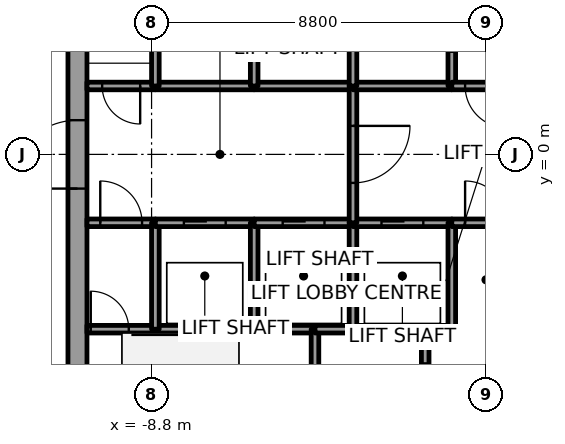
"""IFC4 building model, lengths in metres.
Left out: names, types, materials, properties, quantities, classifications, styles, units other than length and angle.
Written with IfcOpenShell. Run it as: python <this file> out.ifc"""

import sys

from ifc_helpers import new_model, si_unit, direction, frame, frame_2d, origin, place, context, subcontext, project, spatial, rectangle, extrude, element, fill, save


model = new_model("IFC4")
c1 = context("Model", 3, precision=1e-05, world=origin(), true_north=direction((0.0, 1.0)))
c2 = subcontext(c1, "Body", "Model", "MODEL_VIEW")
j1 = project(units=[si_unit("LENGTHUNIT", "METRE"), si_unit("PLANEANGLEUNIT", "RADIAN")], contexts=[c1])
p1 = place(None, origin())
s1 = spatial("IfcSite", under=j1, at=p1, CompositionType="ELEMENT")
p2 = place(p1, origin())
s2 = spatial("IfcBuilding", under=s1, at=p2, CompositionType="ELEMENT")
p3 = place(p2, frame((0.0, 0.0, 66.5)))
s3 = spatial("IfcBuildingStorey", under=s2, at=p3, CompositionType="ELEMENT", Elevation=66.5)
p4 = place(p3, frame((-10.75, -7.5, 0.0), z_axis=(0.0, 0.0, 1.0), x_axis=(0.0, 1.0, 0.0)))
e1 = element("IfcWall", 1, at=p4, inside=s3, PredefinedType="SHEAR", context=c2, shape_type="SweptSolid", body=[
    extrude(rectangle(XDim=15.0, YDim=0.5, at=frame_2d((7.5, 0.0))), origin(), (0.0, 0.0, 1.0), 3.7),
])
p5 = place(p4, frame((6.6, 0.0, 0.0)))
e2 = element("IfcOpeningElement", 2, at=p5, cuts=e1, PredefinedType="OPENING", context=c2, shape_type="SweptSolid", body=[
    extrude(rectangle(XDim=1.8, YDim=2.1, at=frame_2d((0.9, 1.05))), frame((0.0, 0.25, 0.0), z_axis=(0.0, -1.0, 0.0), x_axis=(1.0, 0.0, 0.0)), (0.0, 0.0, 1.0), 0.5),
])
p6 = place(p3, frame((-10.5, -4.6, 0.0), z_axis=(0.0, 0.0, 1.0), x_axis=(1.0, 0.0, 0.0)))
e3 = element("IfcWall", 3, at=p6, inside=s3, PredefinedType="SOLIDWALL", context=c2, shape_type="SweptSolid", body=[
    extrude(rectangle(XDim=1.8, YDim=0.2, at=frame_2d((0.9, 0.0))), origin(), (0.0, 0.0, 1.0), 3.55),
])
p7 = place(p6, frame((0.1, 0.0, 0.0)))
e4 = element("IfcOpeningElement", 4, at=p7, cuts=e3, PredefinedType="OPENING", context=c2, shape_type="SweptSolid", body=[
    extrude(rectangle(XDim=1.0, YDim=2.1, at=frame_2d((0.5, 1.05))), frame((0.0, 0.1, 0.0), z_axis=(0.0, -1.0, 0.0), x_axis=(1.0, 0.0, 0.0)), (0.0, 0.0, 1.0), 0.2),
])
p8 = place(p3, frame((-10.5, -1.8, 0.0), z_axis=(0.0, 0.0, 1.0), x_axis=(1.0, 0.0, 0.0)))
e5 = element("IfcWall", 5, at=p8, inside=s3, PredefinedType="SOLIDWALL", context=c2, shape_type="SweptSolid", body=[
    extrude(rectangle(XDim=1.8, YDim=0.2, at=frame_2d((0.9, 0.0))), origin(), (0.0, 0.0, 1.0), 3.55),
])
p9 = place(p8, frame((0.35, 0.0, 0.0)))
e6 = element("IfcOpeningElement", 6, at=p9, cuts=e5, PredefinedType="OPENING", context=c2, shape_type="SweptSolid", body=[
    extrude(rectangle(XDim=1.1, YDim=2.1, at=frame_2d((0.55, 1.05))), frame((0.0, 0.1, 0.0), z_axis=(0.0, -1.0, 0.0), x_axis=(1.0, 0.0, 0.0)), (0.0, 0.0, 1.0), 0.2),
])
p10 = place(p3, frame((-8.7, 1.8, 0.0), z_axis=(0.0, 0.0, 1.0), x_axis=(-1.0, 0.0, 0.0)))
e7 = element("IfcWall", 7, at=p10, inside=s3, PredefinedType="SOLIDWALL", context=c2, shape_type="SweptSolid", body=[
    extrude(rectangle(XDim=1.8, YDim=0.2, at=frame_2d((0.9, 0.0))), origin(), (0.0, 0.0, 1.0), 3.55),
])
p11 = place(p10, frame((0.4, 0.0, 0.0)))
e8 = element("IfcOpeningElement", 8, at=p11, cuts=e7, PredefinedType="OPENING", context=c2, shape_type="SweptSolid", body=[
    extrude(rectangle(XDim=1.0, YDim=2.1, at=frame_2d((0.5, 1.05))), frame((0.0, 0.1, 0.0), z_axis=(0.0, -1.0, 0.0), x_axis=(1.0, 0.0, 0.0)), (0.0, 0.0, 1.0), 0.2),
])
p12 = place(p3, frame((-8.7, -4.6, 0.0), z_axis=(0.0, 0.0, 1.0), x_axis=(1.0, 0.0, 0.0)))
e9 = element("IfcWall", 9, at=p12, inside=s3, PredefinedType="SOLIDWALL", context=c2, shape_type="SweptSolid", body=[
    extrude(rectangle(XDim=2.6, YDim=0.2, at=frame_2d((1.3, 0.0))), origin(), (0.0, 0.0, 1.0), 3.55),
])
p13 = place(p3, frame((-8.7, -4.6, 0.0), z_axis=(0.0, 0.0, 1.0), x_axis=(0.0, 1.0, 0.0)))
e10 = element("IfcWall", 10, at=p13, inside=s3, PredefinedType="SOLIDWALL", context=c2, shape_type="SweptSolid", body=[
    extrude(rectangle(XDim=2.8, YDim=0.2, at=frame_2d((1.4, 0.0))), origin(), (0.0, 0.0, 1.0), 3.55),
])
p14 = place(p3, frame((-8.7, -1.8, 0.0), z_axis=(0.0, 0.0, 1.0), x_axis=(1.0, 0.0, 0.0)))
e11 = element("IfcWall", 11, at=p14, inside=s3, PredefinedType="SOLIDWALL", context=c2, shape_type="SweptSolid", body=[
    extrude(rectangle(XDim=2.6, YDim=0.2, at=frame_2d((1.3, 0.0))), origin(), (0.0, 0.0, 1.0), 3.55),
])
p15 = place(p14, frame((0.75, 0.0, 0.0)))
e12 = element("IfcOpeningElement", 12, at=p15, cuts=e11, PredefinedType="OPENING", context=c2, shape_type="SweptSolid", body=[
    extrude(rectangle(XDim=1.1, YDim=2.1, at=frame_2d((0.55, 1.05))), frame((0.0, 0.1, 0.0), z_axis=(0.0, -1.0, 0.0), x_axis=(1.0, 0.0, 0.0)), (0.0, 0.0, 1.0), 0.2),
])
p16 = place(p3, frame((-6.1, 1.8, 0.0), z_axis=(0.0, 0.0, 1.0), x_axis=(-1.0, 0.0, 0.0)))
e13 = element("IfcWall", 13, at=p16, inside=s3, PredefinedType="SOLIDWALL", context=c2, shape_type="SweptSolid", body=[
    extrude(rectangle(XDim=2.6, YDim=0.2, at=frame_2d((1.3, 0.0))), origin(), (0.0, 0.0, 1.0), 3.55),
])
p17 = place(p3, frame((-8.7, 1.8, 0.0), z_axis=(0.0, 0.0, 1.0), x_axis=(0.0, 1.0, 0.0)))
e14 = element("IfcWall", 14, at=p17, inside=s3, PredefinedType="SOLIDWALL", context=c2, shape_type="SweptSolid", body=[
    extrude(rectangle(XDim=2.8, YDim=0.2, at=frame_2d((1.4, 0.0))), origin(), (0.0, 0.0, 1.0), 3.55),
])
p18 = place(p3, frame((-6.1, -4.6, 0.0), z_axis=(0.0, 0.0, 1.0), x_axis=(1.0, 0.0, 0.0)))
e15 = element("IfcWall", 15, at=p18, inside=s3, PredefinedType="SOLIDWALL", context=c2, shape_type="SweptSolid", body=[
    extrude(rectangle(XDim=1.6, YDim=0.2, at=frame_2d((0.8, 0.0))), origin(), (0.0, 0.0, 1.0), 3.55),
])
p19 = place(p3, frame((-6.1, -4.6, 0.0), z_axis=(0.0, 0.0, 1.0), x_axis=(0.0, 1.0, 0.0)))
e16 = element("IfcWall", 16, at=p19, inside=s3, PredefinedType="SOLIDWALL", context=c2, shape_type="SweptSolid", body=[
    extrude(rectangle(XDim=2.8, YDim=0.2, at=frame_2d((1.4, 0.0))), origin(), (0.0, 0.0, 1.0), 3.55),
])
p20 = place(p3, frame((-6.1, -1.8, 0.0), z_axis=(0.0, 0.0, 1.0), x_axis=(1.0, 0.0, 0.0)))
e17 = element("IfcWall", 17, at=p20, inside=s3, PredefinedType="SOLIDWALL", context=c2, shape_type="SweptSolid", body=[
    extrude(rectangle(XDim=2.6, YDim=0.2, at=frame_2d((1.3, 0.0))), origin(), (0.0, 0.0, 1.0), 3.55),
])
p21 = place(p20, frame((0.75, 0.0, 0.0)))
e18 = element("IfcOpeningElement", 18, at=p21, cuts=e17, PredefinedType="OPENING", context=c2, shape_type="SweptSolid", body=[
    extrude(rectangle(XDim=1.1, YDim=2.1, at=frame_2d((0.55, 1.05))), frame((0.0, 0.1, 0.0), z_axis=(0.0, -1.0, 0.0), x_axis=(1.0, 0.0, 0.0)), (0.0, 0.0, 1.0), 0.2),
])
p22 = place(p3, frame((-3.5, 1.8, 0.0), z_axis=(0.0, 0.0, 1.0), x_axis=(-1.0, 0.0, 0.0)))
e19 = element("IfcWall", 19, at=p22, inside=s3, PredefinedType="SOLIDWALL", context=c2, shape_type="SweptSolid", body=[
    extrude(rectangle(XDim=2.6, YDim=0.2, at=frame_2d((1.3, 0.0))), origin(), (0.0, 0.0, 1.0), 3.55),
])
p23 = place(p3, frame((-6.1, 1.8, 0.0), z_axis=(0.0, 0.0, 1.0), x_axis=(0.0, 1.0, 0.0)))
e20 = element("IfcWall", 20, at=p23, inside=s3, PredefinedType="SOLIDWALL", context=c2, shape_type="SweptSolid", body=[
    extrude(rectangle(XDim=2.8, YDim=0.2, at=frame_2d((1.4, 0.0))), origin(), (0.0, 0.0, 1.0), 3.55),
])
p24 = place(p3, frame((-4.5, -4.6, 0.0), z_axis=(0.0, 0.0, 1.0), x_axis=(0.0, -1.0, 0.0)))
e21 = element("IfcWall", 21, at=p24, inside=s3, PredefinedType="SOLIDWALL", context=c2, shape_type="SweptSolid", body=[
    extrude(rectangle(XDim=2.9, YDim=0.2, at=frame_2d((1.45, 0.0))), origin(), (0.0, 0.0, 1.0), 3.55),
])
p25 = place(p3, frame((-4.5, -4.6, 0.0), z_axis=(0.0, 0.0, 1.0), x_axis=(1.0, 0.0, 0.0)))
e22 = element("IfcWall", 22, at=p25, inside=s3, PredefinedType="SOLIDWALL", context=c2, shape_type="SweptSolid", body=[
    extrude(rectangle(XDim=1.0, YDim=0.2, at=frame_2d((0.5, 0.0))), origin(), (0.0, 0.0, 1.0), 3.55),
])
p26 = place(p3, frame((-3.5, -4.6, 0.0), z_axis=(0.0, 0.0, 1.0), x_axis=(1.0, 0.0, 0.0)))
e23 = element("IfcWall", 23, at=p26, inside=s3, PredefinedType="SOLIDWALL", context=c2, shape_type="SweptSolid", body=[
    extrude(rectangle(XDim=1.9, YDim=0.2, at=frame_2d((0.95, 0.0))), origin(), (0.0, 0.0, 1.0), 3.55),
])
p27 = place(p3, frame((-3.5, -4.6, 0.0), z_axis=(0.0, 0.0, 1.0), x_axis=(0.0, 1.0, 0.0)))
e24 = element("IfcWall", 24, at=p27, inside=s3, PredefinedType="SOLIDWALL", context=c2, shape_type="SweptSolid", body=[
    extrude(rectangle(XDim=2.8, YDim=0.2, at=frame_2d((1.4, 0.0))), origin(), (0.0, 0.0, 1.0), 3.55),
])
p28 = place(p3, frame((-3.5, -1.8, 0.0), z_axis=(0.0, 0.0, 1.0), x_axis=(1.0, 0.0, 0.0)))
e25 = element("IfcWall", 25, at=p28, inside=s3, PredefinedType="SOLIDWALL", context=c2, shape_type="SweptSolid", body=[
    extrude(rectangle(XDim=2.6, YDim=0.2, at=frame_2d((1.3, 0.0))), origin(), (0.0, 0.0, 1.0), 3.55),
])
p29 = place(p28, frame((0.75, 0.0, 0.0)))
e26 = element("IfcOpeningElement", 26, at=p29, cuts=e25, PredefinedType="OPENING", context=c2, shape_type="SweptSolid", body=[
    extrude(rectangle(XDim=1.1, YDim=2.1, at=frame_2d((0.55, 1.05))), frame((0.0, 0.1, 0.0), z_axis=(0.0, -1.0, 0.0), x_axis=(1.0, 0.0, 0.0)), (0.0, 0.0, 1.0), 0.2),
])
p30 = place(p3, frame((-3.5, 1.8, 0.0), z_axis=(0.0, 0.0, 1.0), x_axis=(0.0, -1.0, 0.0)))
e27 = element("IfcWall", 27, at=p30, inside=s3, PredefinedType="SOLIDWALL", context=c2, shape_type="SweptSolid", body=[
    extrude(rectangle(XDim=3.6, YDim=0.2, at=frame_2d((1.8, 0.0))), origin(), (0.0, 0.0, 1.0), 3.55),
])
p31 = place(p30, frame((1.05, 0.0, 0.0)))
e28 = element("IfcOpeningElement", 28, at=p31, cuts=e27, PredefinedType="OPENING", context=c2, shape_type="SweptSolid", body=[
    extrude(rectangle(XDim=1.5, YDim=2.1, at=frame_2d((0.75, 1.05))), frame((0.0, 0.1, 0.0), z_axis=(0.0, -1.0, 0.0), x_axis=(1.0, 0.0, 0.0)), (0.0, 0.0, 1.0), 0.2),
])
p32 = place(p3, frame((-0.9, 1.8, 0.0), z_axis=(0.0, 0.0, 1.0), x_axis=(-1.0, 0.0, 0.0)))
e29 = element("IfcWall", 29, at=p32, inside=s3, PredefinedType="SOLIDWALL", context=c2, shape_type="SweptSolid", body=[
    extrude(rectangle(XDim=2.6, YDim=0.2, at=frame_2d((1.3, 0.0))), origin(), (0.0, 0.0, 1.0), 3.55),
])
p33 = place(p3, frame((-3.5, 4.6, 0.0), z_axis=(0.0, 0.0, 1.0), x_axis=(0.0, -1.0, 0.0)))
e30 = element("IfcWall", 30, at=p33, inside=s3, PredefinedType="SOLIDWALL", context=c2, shape_type="SweptSolid", body=[
    extrude(rectangle(XDim=2.8, YDim=0.2, at=frame_2d((1.4, 0.0))), origin(), (0.0, 0.0, 1.0), 3.55),
])
p34 = place(p3, frame((-0.9, 1.8, 0.0), z_axis=(0.0, 0.0, 1.0), x_axis=(0.0, 1.0, 0.0)))
e31 = element("IfcWall", 31, at=p34, inside=s3, PredefinedType="SOLIDWALL", context=c2, shape_type="SweptSolid", body=[
    extrude(rectangle(XDim=3.0, YDim=0.2, at=frame_2d((1.5, 0.0))), origin(), (0.0, 0.0, 1.0), 3.55),
])
p35 = place(p34, frame((0.9, 0.0, 0.0)))
e32 = element("IfcOpeningElement", 32, at=p35, cuts=e31, PredefinedType="OPENING", context=c2, shape_type="SweptSolid", body=[
    extrude(rectangle(XDim=1.2, YDim=2.1, at=frame_2d((0.6, 1.05))), frame((0.0, 0.1, 0.0), z_axis=(0.0, -1.0, 0.0), x_axis=(1.0, 0.0, 0.0)), (0.0, 0.0, 1.0), 0.2),
])
p36 = place(p3, frame((-1.6, -7.5, 0.0), z_axis=(0.0, 0.0, 1.0), x_axis=(0.0, 1.0, 0.0)))
e33 = element("IfcWall", 33, at=p36, inside=s3, PredefinedType="SOLIDWALL", context=c2, shape_type="SweptSolid", body=[
    extrude(rectangle(XDim=2.9, YDim=0.2, at=frame_2d((1.45, 0.0))), origin(), (0.0, 0.0, 1.0), 3.55),
])
p37 = place(p36, frame((0.9, 0.0, 0.0)))
e34 = element("IfcOpeningElement", 34, at=p37, cuts=e33, PredefinedType="OPENING", context=c2, shape_type="SweptSolid", body=[
    extrude(rectangle(XDim=1.1, YDim=2.1, at=frame_2d((0.55, 1.05))), frame((0.0, 0.1, 0.0), z_axis=(0.0, -1.0, 0.0), x_axis=(1.0, 0.0, 0.0)), (0.0, 0.0, 1.0), 0.2),
])
p38 = place(p3, frame((-1.6, -4.6, 0.0), z_axis=(0.0, 0.0, 1.0), x_axis=(1.0, 0.0, 0.0)))
e35 = element("IfcWall", 35, at=p38, inside=s3, PredefinedType="SOLIDWALL", context=c2, shape_type="SweptSolid", body=[
    extrude(rectangle(XDim=0.7, YDim=0.2, at=frame_2d((0.35, 0.0))), origin(), (0.0, 0.0, 1.0), 3.55),
])
p39 = place(p3, frame((-0.9, -4.6, 0.0), z_axis=(0.0, 0.0, 1.0), x_axis=(0.0, 1.0, 0.0)))
e36 = element("IfcWall", 36, at=p39, inside=s3, PredefinedType="SOLIDWALL", context=c2, shape_type="SweptSolid", body=[
    extrude(rectangle(XDim=2.8, YDim=0.2, at=frame_2d((1.4, 0.0))), origin(), (0.0, 0.0, 1.0), 3.55),
])
p40 = place(p3, frame((-0.9, -1.8, 0.0), z_axis=(0.0, 0.0, 1.0), x_axis=(1.0, 0.0, 0.0)))
e37 = element("IfcWall", 37, at=p40, inside=s3, PredefinedType="SOLIDWALL", context=c2, shape_type="SweptSolid", body=[
    extrude(rectangle(XDim=1.8, YDim=0.2, at=frame_2d((0.9, 0.0))), origin(), (0.0, 0.0, 1.0), 3.55),
])
p41 = place(p40, frame((0.35, 0.0, 0.0)))
e38 = element("IfcOpeningElement", 38, at=p41, cuts=e37, PredefinedType="OPENING", context=c2, shape_type="SweptSolid", body=[
    extrude(rectangle(XDim=1.1, YDim=2.1, at=frame_2d((0.55, 1.05))), frame((0.0, 0.1, 0.0), z_axis=(0.0, -1.0, 0.0), x_axis=(1.0, 0.0, 0.0)), (0.0, 0.0, 1.0), 0.2),
])
p42 = place(p3, frame((0.9, 1.8, 0.0), z_axis=(0.0, 0.0, 1.0), x_axis=(-1.0, 0.0, 0.0)))
e39 = element("IfcWall", 39, at=p42, inside=s3, PredefinedType="SOLIDWALL", context=c2, shape_type="SweptSolid", body=[
    extrude(rectangle(XDim=1.8, YDim=0.2, at=frame_2d((0.9, 0.0))), origin(), (0.0, 0.0, 1.0), 3.55),
])
p43 = place(p42, frame((0.35, 0.0, 0.0)))
e40 = element("IfcOpeningElement", 40, at=p43, cuts=e39, PredefinedType="OPENING", context=c2, shape_type="SweptSolid", body=[
    extrude(rectangle(XDim=1.1, YDim=2.1, at=frame_2d((0.55, 1.05))), frame((0.0, 0.1, 0.0), z_axis=(0.0, -1.0, 0.0), x_axis=(1.0, 0.0, 0.0)), (0.0, 0.0, 1.0), 0.2),
])
p44 = place(p15, origin())
e41 = element("IfcDoor", 41, at=p44, inside=s3, OperationType="SLIDING_TO_LEFT", PredefinedType="DOOR", context=c2, shape_type="SweptSolid", body=[
    extrude(rectangle(XDim=1.1, YDim=2.1, at=frame_2d((0.55, 1.05))), frame((0.0, 0.025, 0.0), z_axis=(0.0, -1.0, 0.0), x_axis=(1.0, 0.0, 0.0)), (0.0, 0.0, 1.0), 0.05),
])
fill(e12, e41)
p45 = place(p21, origin())
e42 = element("IfcDoor", 42, at=p45, inside=s3, OperationType="SLIDING_TO_LEFT", PredefinedType="DOOR", context=c2, shape_type="SweptSolid", body=[
    extrude(rectangle(XDim=1.1, YDim=2.1, at=frame_2d((0.55, 1.05))), frame((0.0, 0.025, 0.0), z_axis=(0.0, -1.0, 0.0), x_axis=(1.0, 0.0, 0.0)), (0.0, 0.0, 1.0), 0.05),
])
fill(e18, e42)
p46 = place(p29, origin())
e43 = element("IfcDoor", 43, at=p46, inside=s3, OperationType="SLIDING_TO_RIGHT", PredefinedType="DOOR", context=c2, shape_type="SweptSolid", body=[
    extrude(rectangle(XDim=1.1, YDim=2.1, at=frame_2d((0.55, 1.05))), frame((0.0, 0.025, 0.0), z_axis=(0.0, -1.0, 0.0), x_axis=(1.0, 0.0, 0.0)), (0.0, 0.0, 1.0), 0.05),
])
fill(e26, e43)
p47 = place(p31, origin())
e44 = element("IfcDoor", 44, at=p47, inside=s3, OperationType="DOUBLE_DOOR_SINGLE_SWING", PredefinedType="DOOR", context=c2, shape_type="SweptSolid", body=[
    extrude(rectangle(XDim=1.5, YDim=2.1, at=frame_2d((0.75, 1.05))), frame((0.0, 0.025, 0.0), z_axis=(0.0, -1.0, 0.0), x_axis=(1.0, 0.0, 0.0)), (0.0, 0.0, 1.0), 0.05),
])
fill(e28, e44)
p48 = place(p9, origin())
e45 = element("IfcDoor", 45, at=p48, inside=s3, OperationType="SINGLE_SWING_RIGHT", PredefinedType="DOOR", context=c2, shape_type="SweptSolid", body=[
    extrude(rectangle(XDim=1.1, YDim=2.1, at=frame_2d((0.55, 1.05))), frame((0.0, 0.025, 0.0), z_axis=(0.0, -1.0, 0.0), x_axis=(1.0, 0.0, 0.0)), (0.0, 0.0, 1.0), 0.05),
])
fill(e6, e45)
p49 = place(p43, origin())
e46 = element("IfcDoor", 46, at=p49, inside=s3, OperationType="SINGLE_SWING_LEFT", PredefinedType="DOOR", context=c2, shape_type="SweptSolid", body=[
    extrude(rectangle(XDim=1.1, YDim=2.1, at=frame_2d((0.55, 1.05))), frame((0.0, 0.025, 0.0), z_axis=(0.0, -1.0, 0.0), x_axis=(1.0, 0.0, 0.0)), (0.0, 0.0, 1.0), 0.05),
])
fill(e40, e46)
p50 = place(p41, origin())
e47 = element("IfcDoor", 47, at=p50, inside=s3, OperationType="SINGLE_SWING_RIGHT", PredefinedType="DOOR", context=c2, shape_type="SweptSolid", body=[
    extrude(rectangle(XDim=1.1, YDim=2.1, at=frame_2d((0.55, 1.05))), frame((0.0, 0.025, 0.0), z_axis=(0.0, -1.0, 0.0), x_axis=(1.0, 0.0, 0.0)), (0.0, 0.0, 1.0), 0.05),
])
fill(e38, e47)
p51 = place(p11, origin())
e48 = element("IfcDoor", 48, at=p51, inside=s3, OperationType="SINGLE_SWING_RIGHT", PredefinedType="DOOR", context=c2, shape_type="SweptSolid", body=[
    extrude(rectangle(XDim=1.0, YDim=2.1, at=frame_2d((0.5, 1.05))), frame((0.0, 0.025, 0.0), z_axis=(0.0, -1.0, 0.0), x_axis=(1.0, 0.0, 0.0)), (0.0, 0.0, 1.0), 0.05),
])
fill(e8, e48)
p52 = place(p7, origin())
e49 = element("IfcDoor", 49, at=p52, inside=s3, OperationType="SINGLE_SWING_LEFT", PredefinedType="DOOR", context=c2, shape_type="SweptSolid", body=[
    extrude(rectangle(XDim=1.0, YDim=2.1, at=frame_2d((0.5, 1.05))), frame((0.0, 0.025, 0.0), z_axis=(0.0, -1.0, 0.0), x_axis=(1.0, 0.0, 0.0)), (0.0, 0.0, 1.0), 0.05),
])
fill(e4, e49)
p53 = place(p5, origin())
e50 = element("IfcDoor", 50, at=p53, inside=s3, OperationType="DOUBLE_DOOR_SINGLE_SWING", PredefinedType="DOOR", context=c2, shape_type="SweptSolid", body=[
    extrude(rectangle(XDim=1.8, YDim=2.1, at=frame_2d((0.9, 1.05))), frame((0.0, 0.025, 0.0), z_axis=(0.0, -1.0, 0.0), x_axis=(1.0, 0.0, 0.0)), (0.0, 0.0, 1.0), 0.05),
])
fill(e2, e50)
save(model, sys.argv[1])
